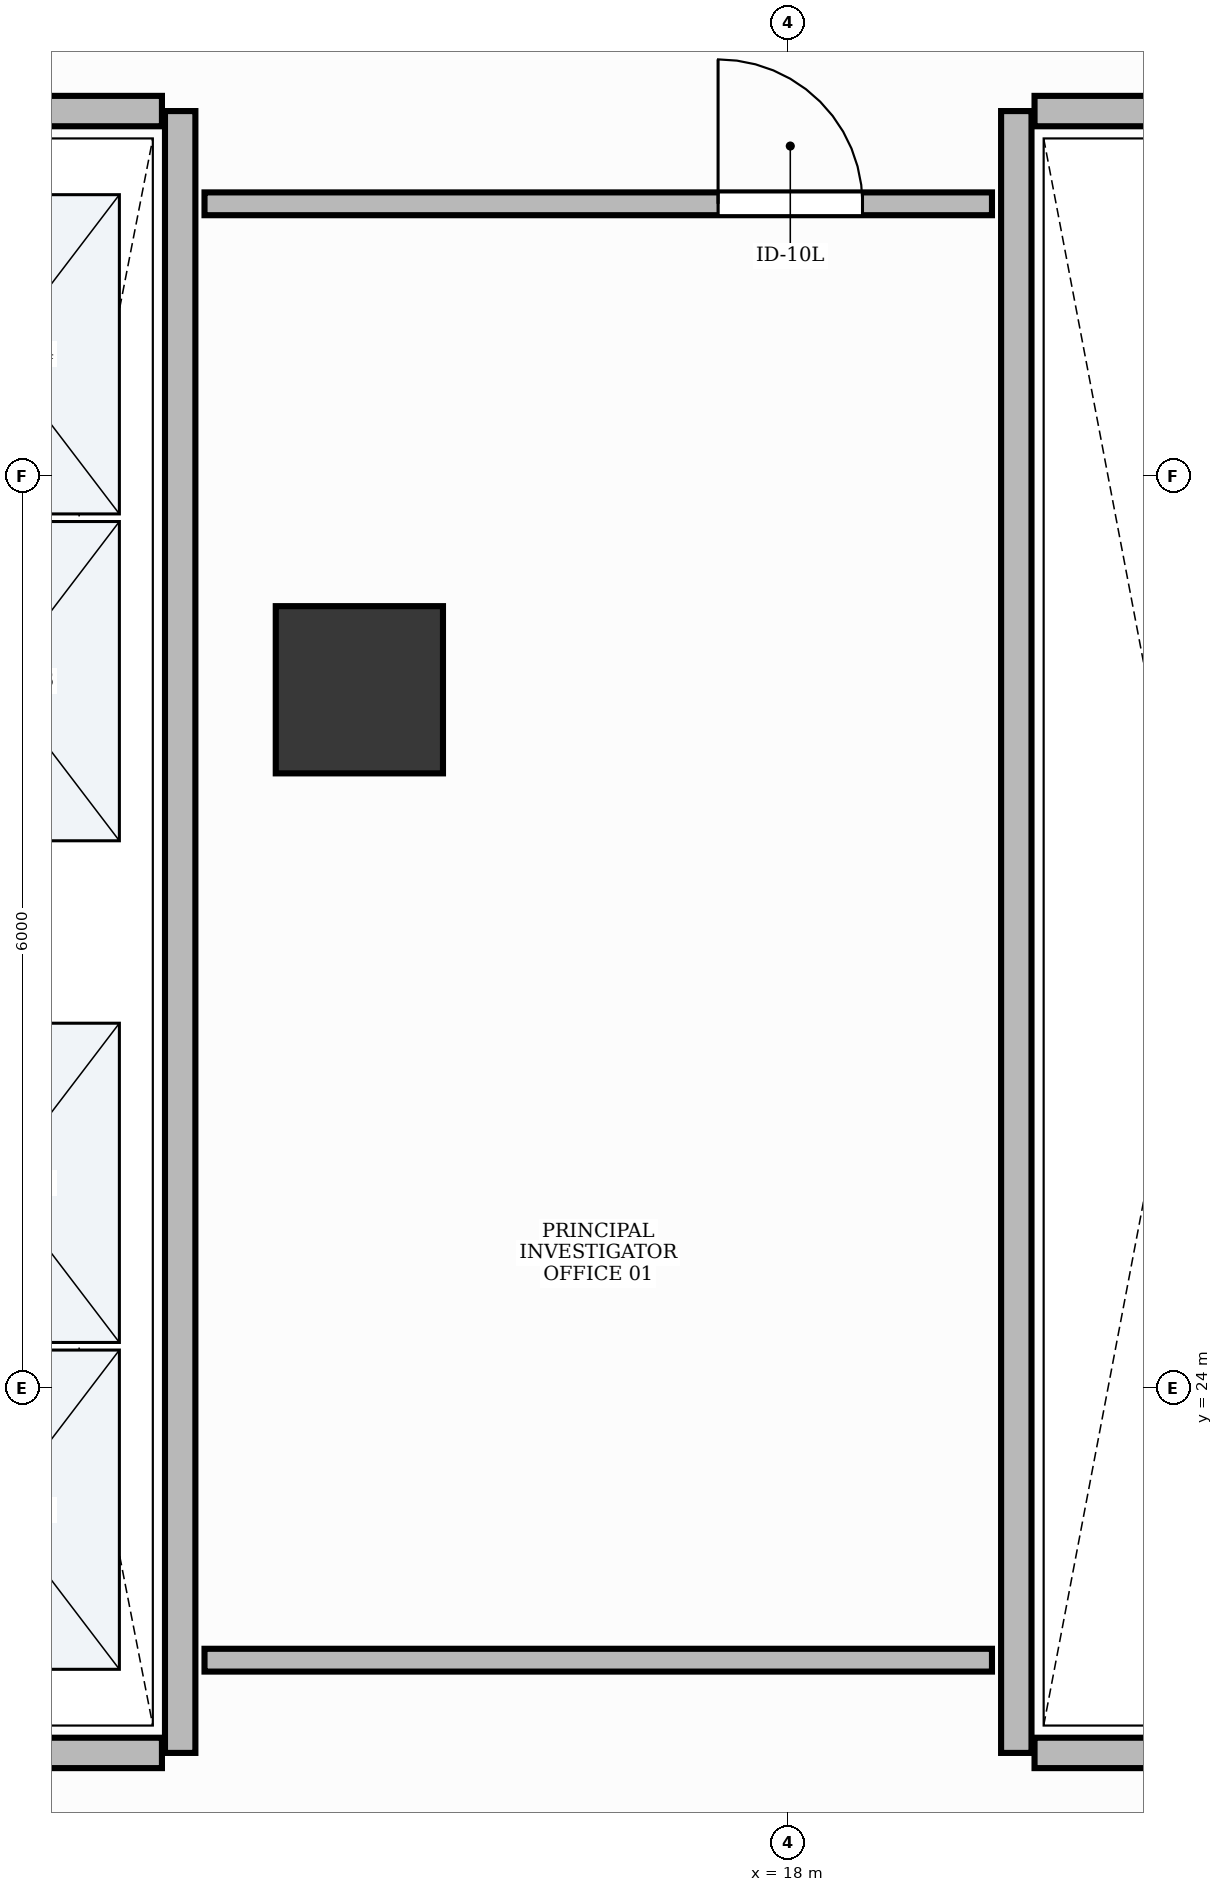
"""IFC4 building model, lengths in metres.
Left out: names, types, materials, properties, quantities, classifications, styles, units other than length and angle.
Written with IfcOpenShell. Run it as: python <this file> out.ifc"""

import sys

from ifc_helpers import new_model, si_unit, direction, frame, frame_2d, origin, origin_2d, place, context, subcontext, project, spatial, rectangle, extrude, element, fill, save


model = new_model("IFC4")
c1 = context("Model", 3, precision=1e-05, world=origin(), true_north=direction((0.0, 1.0)))
c2 = subcontext(c1, "Body", "Model", "MODEL_VIEW")
j1 = project(units=[si_unit("LENGTHUNIT", "METRE"), si_unit("PLANEANGLEUNIT", "RADIAN")], contexts=[c1])
p1 = place(None, origin())
s1 = spatial("IfcSite", under=j1, at=p1, CompositionType="ELEMENT")
p2 = place(p1, origin())
s2 = spatial("IfcBuilding", under=s1, at=p2, CompositionType="ELEMENT")
p3 = place(p2, frame((0.0, 0.0, 25.8)))
s3 = spatial("IfcBuildingStorey", under=s2, at=p3, CompositionType="ELEMENT", Elevation=25.8)
p4 = place(p3, frame((15.179, 28.594, -0.0), z_axis=(0.0, 0.0, 1.0), x_axis=(1.0, 0.0, 0.0)))
e1 = element("IfcColumn", 1, at=p4, inside=s3, PredefinedType="COLUMN", context=c2, shape_type="SweptSolid", body=[
    extrude(rectangle(XDim=1.1, YDim=1.1, at=origin_2d()), origin(), (0.0, 0.0, 1.0), 3.901),
])
p5 = place(p3, frame((14.0, 21.6, 0.0), z_axis=(0.0, 0.0, 1.0), x_axis=(0.0, 1.0, 0.0)))
e2 = element("IfcWall", 2, at=p5, inside=s3, PredefinedType="PARTITIONING", context=c2, shape_type="SweptSolid", body=[
    extrude(rectangle(XDim=10.8, YDim=0.2, at=frame_2d((5.4, 0.0))), origin(), (0.0, 0.0, 1.0), 2.91),
])
for number, where, z_axis, x_axis in (
    (3, (11.72, 21.6, 0.0), (0.0, 0.0, 1.0), (1.0, 0.0, 0.0)),
    (4, (11.72, 32.4, 0.0), (0.0, 0.0, 1.0), (1.0, 0.0, 0.0)),
):
    element("IfcWall", number, at=place(p3, frame(where, z_axis=z_axis, x_axis=x_axis)), inside=s3, PredefinedType="PARTITIONING", context=c2, shape_type="SweptSolid", body=[
        extrude(rectangle(XDim=2.16, YDim=0.2, at=frame_2d((1.08, 0.0))), origin(), (0.0, 0.0, 1.0), 2.91),
    ])
p6 = place(p3, frame((19.5, 21.6, 0.0), z_axis=(0.0, 0.0, 1.0), x_axis=(0.0, 1.0, 0.0)))
e5 = element("IfcWall", 5, at=p6, inside=s3, PredefinedType="PARTITIONING", context=c2, shape_type="SweptSolid", body=[
    extrude(rectangle(XDim=10.8, YDim=0.2, at=frame_2d((5.4, 0.0))), origin(), (0.0, 0.0, 1.0), 2.91),
])
for number, where, z_axis, x_axis in (
    (6, (19.62, 21.6, 0.0), (0.0, 0.0, 1.0), (1.0, 0.0, 0.0)),
    (7, (19.62, 32.4, 0.0), (0.0, 0.0, 1.0), (1.0, 0.0, 0.0)),
):
    element("IfcWall", number, at=place(p3, frame(where, z_axis=z_axis, x_axis=x_axis)), inside=s3, PredefinedType="PARTITIONING", context=c2, shape_type="SweptSolid", body=[
        extrude(rectangle(XDim=2.11, YDim=0.2, at=frame_2d((1.055, 0.0))), origin(), (0.0, 0.0, 1.0), 2.91),
    ])
p7 = place(p3, frame((14.16, 31.79, 0.0), z_axis=(0.0, 0.0, 1.0), x_axis=(1.0, 0.0, 0.0)))
e8 = element("IfcWall", 8, at=p7, inside=s3, PredefinedType="PARTITIONING", context=c2, shape_type="SweptSolid", body=[
    extrude(rectangle(XDim=5.18, YDim=0.15, at=frame_2d((2.59, 0.0))), origin(), (0.0, 0.0, 1.0), 2.91),
])
p8 = place(p7, frame((3.378, 0.0, 0.0)))
e9 = element("IfcOpeningElement", 9, at=p8, cuts=e8, PredefinedType="OPENING", context=c2, shape_type="SweptSolid", body=[
    extrude(rectangle(XDim=0.95, YDim=2.15, at=frame_2d((0.475, 1.075))), frame((0.0, 0.09, 0.0), z_axis=(0.0, -1.0, 0.0), x_axis=(1.0, 0.0, 0.0)), (0.0, 0.0, 1.0), 0.18),
])
p9 = place(p3, frame((19.34, 22.21, 0.0), z_axis=(0.0, 0.0, 1.0), x_axis=(-1.0, 0.0, 0.0)))
e10 = element("IfcWall", 10, at=p9, inside=s3, PredefinedType="PARTITIONING", context=c2, shape_type="SweptSolid", body=[
    extrude(rectangle(XDim=5.18, YDim=0.15, at=frame_2d((2.59, 0.0))), origin(), (0.0, 0.0, 1.0), 2.91),
])
p10 = place(p8, origin())
e11 = element("IfcDoor", 11, at=p10, inside=s3, OperationType="SINGLE_SWING_LEFT", PredefinedType="DOOR", context=c2, shape_type="SweptSolid", body=[
    extrude(rectangle(XDim=0.95, YDim=2.15, at=frame_2d((0.475, 1.075))), frame((0.0, 0.025, 0.0), z_axis=(0.0, -1.0, 0.0), x_axis=(1.0, 0.0, 0.0)), (0.0, 0.0, 1.0), 0.05),
])
fill(e9, e11)
save(model, sys.argv[1])
